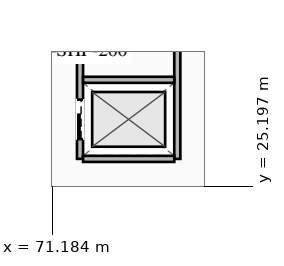
"""IFC4 building model, lengths in metres.
Left out: names, types, materials, properties, quantities, classifications, styles, units other than length and angle.
Written with IfcOpenShell. Run it as: python <this file> out.ifc"""

import sys

from ifc_helpers import new_model, si_unit, direction, frame, frame_2d, origin, place, context, subcontext, project, spatial, rectangle, extrude, element, fill, save


model = new_model("IFC4")
c1 = context("Model", 3, precision=1e-05, world=origin(), true_north=direction((0.0, 1.0)))
c2 = subcontext(c1, "Body", "Model", "MODEL_VIEW")
j1 = project(units=[si_unit("LENGTHUNIT", "METRE"), si_unit("PLANEANGLEUNIT", "RADIAN")], contexts=[c1])
p1 = place(None, origin())
s1 = spatial("IfcSite", under=j1, at=p1, CompositionType="ELEMENT")
p2 = place(p1, origin())
s2 = spatial("IfcBuilding", under=s1, at=p2, CompositionType="ELEMENT")
p3 = place(p2, frame((0.0, 0.0, -5.5)))
s3 = spatial("IfcBuildingStorey", under=s2, at=p3, CompositionType="ELEMENT", Elevation=-5.5)
p4 = place(p3, frame((72.1, 26.1, 0.0), z_axis=(0.0, 0.0, 1.0), x_axis=(0.0, 1.0, 0.0)))
e1 = element("IfcWall", 1, at=p4, inside=s3, PredefinedType="SOLIDWALL", context=c2, shape_type="SweptSolid", body=[
    extrude(rectangle(XDim=11.8, YDim=0.2, at=frame_2d((5.9, 0.0))), origin(), (0.0, 0.0, 1.0), 4.243),
])
p5 = place(p4, frame((0.65, 0.0, 0.0)))
e2 = element("IfcOpeningElement", 2, at=p5, cuts=e1, PredefinedType="OPENING", context=c2, shape_type="SweptSolid", body=[
    extrude(rectangle(XDim=1.3, YDim=2.25, at=frame_2d((0.65, 1.125))), frame((0.0, 0.11, 0.0), z_axis=(0.0, -1.0, 0.0), x_axis=(1.0, 0.0, 0.0)), (0.0, 0.0, 1.0), 0.22),
])
p6 = place(p4, frame((9.85, 0.0, 0.0)))
e3 = element("IfcOpeningElement", 3, at=p6, cuts=e1, PredefinedType="OPENING", context=c2, shape_type="SweptSolid", body=[
    extrude(rectangle(XDim=1.3, YDim=2.25, at=frame_2d((0.65, 1.125))), frame((0.0, 0.11, 0.0), z_axis=(0.0, -1.0, 0.0), x_axis=(1.0, 0.0, 0.0)), (0.0, 0.0, 1.0), 0.22),
])
p7 = place(p3, frame((75.3, 26.1, 0.0), z_axis=(0.0, 0.0, 1.0), x_axis=(0.0, 1.0, 0.0)))
e4 = element("IfcWall", 4, at=p7, inside=s3, PredefinedType="SOLIDWALL", context=c2, shape_type="SweptSolid", body=[
    extrude(rectangle(XDim=11.8, YDim=0.2, at=frame_2d((5.9, 0.0))), origin(), (0.0, 0.0, 1.0), 4.243),
])
for number, where, z_axis, x_axis in (
    (5, (72.2, 26.1, 0.0), (0.0, 0.0, 1.0), (1.0, 0.0, 0.0)),
    (6, (72.2, 28.7, 0.0), (0.0, 0.0, 1.0), (1.0, 0.0, 0.0)),
):
    element("IfcWall", number, at=place(p3, frame(where, z_axis=z_axis, x_axis=x_axis)), inside=s3, PredefinedType="SOLIDWALL", context=c2, shape_type="SweptSolid", body=[
        extrude(rectangle(XDim=3.0, YDim=0.2, at=frame_2d((1.5, 0.0))), origin(), (0.0, 0.0, 1.0), 4.243),
    ])
p8 = place(p5, origin())
e7 = element("IfcDoor", 7, at=p8, inside=s3, OperationType="SLIDING_TO_LEFT", PredefinedType="DOOR", context=c2, shape_type="SweptSolid", body=[
    extrude(rectangle(XDim=1.3, YDim=2.25, at=frame_2d((0.65, 1.125))), frame((0.0, 0.025, 0.0), z_axis=(0.0, -1.0, 0.0), x_axis=(1.0, 0.0, 0.0)), (0.0, 0.0, 1.0), 0.05),
])
fill(e2, e7)
save(model, sys.argv[1])
